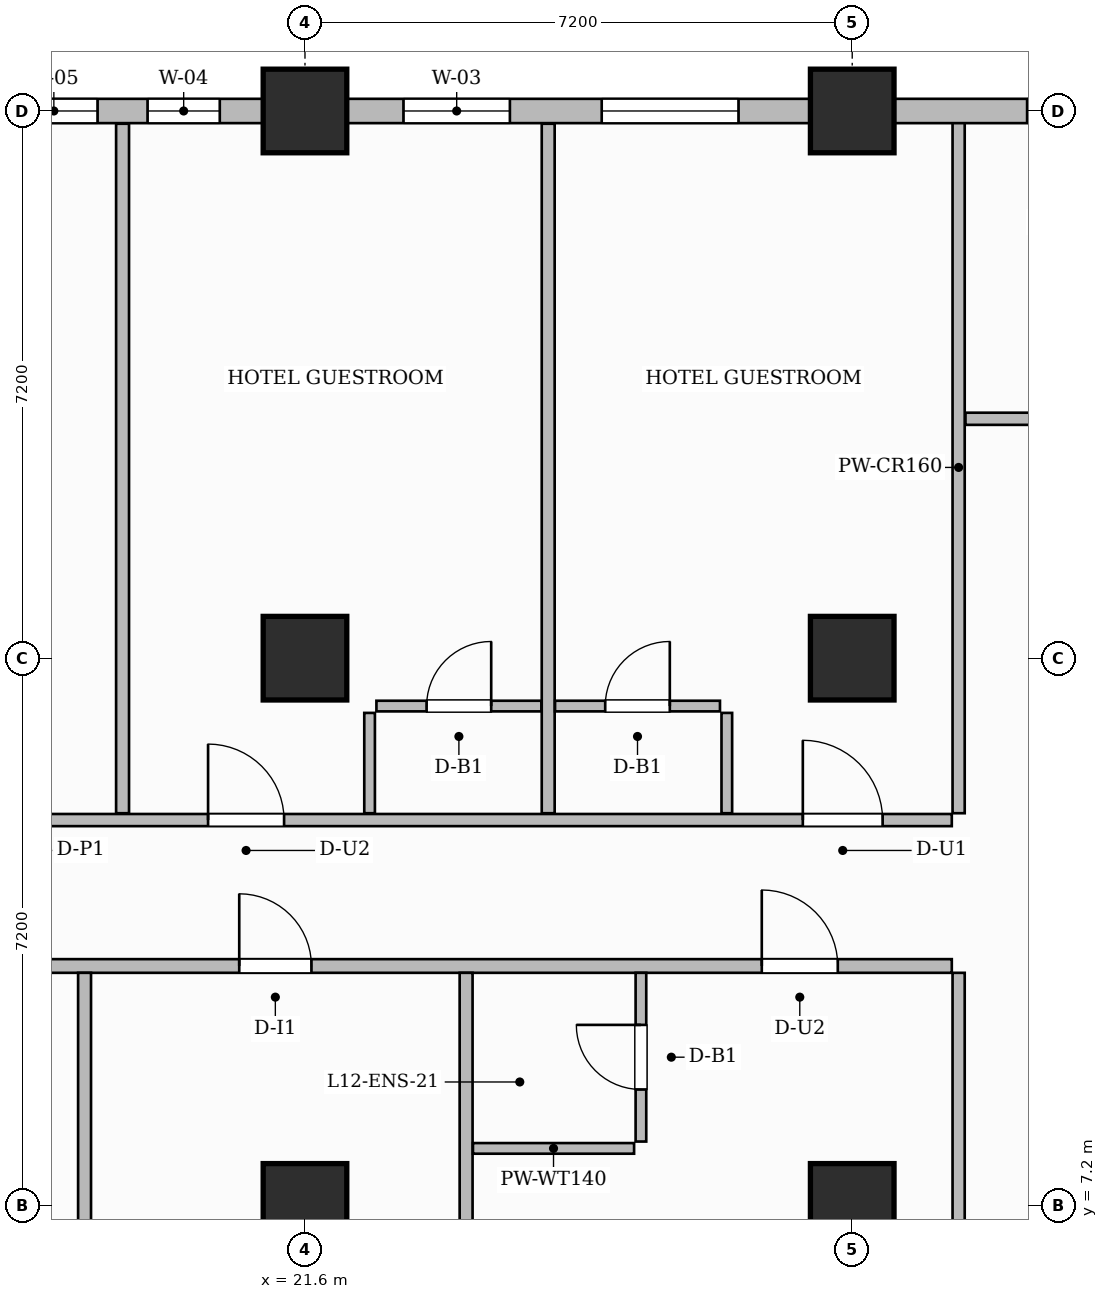
"""IFC4 building model, lengths in metres.
Left out: names, types, materials, properties, quantities, classifications, styles, units other than length and angle.
Written with IfcOpenShell. Run it as: python <this file> out.ifc"""

import sys

from ifc_helpers import new_model, si_unit, direction, frame, frame_2d, origin, origin_2d, place, context, subcontext, project, spatial, rectangle, extrude, source, transform, mapped, element, fill, save


model = new_model("IFC4")
c1 = context("Model", 3, precision=1e-05, world=origin(), true_north=direction((0.0, 1.0)))
c2 = subcontext(c1, "Body", "Model", "MODEL_VIEW")
j1 = project(units=[si_unit("LENGTHUNIT", "METRE"), si_unit("PLANEANGLEUNIT", "RADIAN")], contexts=[c1])
p1 = place(None, origin())
s1 = spatial("IfcSite", under=j1, at=p1, CompositionType="ELEMENT")
p2 = place(p1, origin())
s2 = spatial("IfcBuilding", under=s1, at=p2, CompositionType="ELEMENT")
p3 = place(p2, frame((0.0, 0.0, 54.6)))
s3 = spatial("IfcBuildingStorey", under=s2, at=p3, CompositionType="ELEMENT", Elevation=54.6)
m1 = source(origin(), c2, "Body", "SweptSolid", [
    extrude(rectangle(XDim=1.1, YDim=1.1, at=origin_2d()), origin(), (0.0, 0.0, 1.0), 3.7),
])
for number, where, z_axis, x_axis in (
    (1, (21.6, 7.2, 0.0), (0.0, 0.0, 1.0), (1.0, 0.0, 0.0)),
    (2, (21.6, 14.4, 0.0), (0.0, 0.0, 1.0), (1.0, 0.0, 0.0)),
    (3, (21.6, 21.6, 0.0), (0.0, 0.0, 1.0), (1.0, 0.0, 0.0)),
    (4, (28.8, 7.2, 0.0), (0.0, 0.0, 1.0), (1.0, 0.0, 0.0)),
    (5, (28.8, 14.4, 0.0), (0.0, 0.0, 1.0), (1.0, 0.0, 0.0)),
    (6, (28.8, 21.6, 0.0), (0.0, 0.0, 1.0), (1.0, 0.0, 0.0)),
):
    element("IfcColumn", number, at=place(p3, frame(where, z_axis=z_axis, x_axis=x_axis)), inside=s3, PredefinedType="COLUMN", context=c2, shape_type="MappedRepresentation", body=[
        mapped(m1, transform((0.0, 0.0, 0.0), scale=1.0)),
    ])
p4 = place(p3, frame((14.568, 10.35, 0.0), z_axis=(0.0, 0.0, 1.0), x_axis=(1.0, 0.0, 0.0)))
e7 = element("IfcWall", 7, at=p4, inside=s3, PredefinedType="PARTITIONING", context=c2, shape_type="SweptSolid", body=[
    extrude(rectangle(XDim=15.542, YDim=0.18, at=frame_2d((7.771, 0.0))), origin(), (0.0, 0.0, 1.0), 3.45),
])
p5 = place(p4, frame((1.282, 0.0, 0.0)))
e8 = element("IfcOpeningElement", 8, at=p5, cuts=e7, PredefinedType="OPENING", context=c2, shape_type="SweptSolid", body=[
    extrude(rectangle(XDim=1.4, YDim=2.35, at=frame_2d((0.7, 1.175))), frame((0.0, 0.1, 0.0), z_axis=(0.0, -1.0, 0.0), x_axis=(1.0, 0.0, 0.0)), (0.0, 0.0, 1.0), 0.2),
])
p6 = place(p4, frame((6.167, 0.0, 0.0)))
e9 = element("IfcOpeningElement", 9, at=p6, cuts=e7, PredefinedType="OPENING", context=c2, shape_type="SweptSolid", body=[
    extrude(rectangle(XDim=0.95, YDim=2.15, at=frame_2d((0.475, 1.075))), frame((0.0, 0.1, 0.0), z_axis=(0.0, -1.0, 0.0), x_axis=(1.0, 0.0, 0.0)), (0.0, 0.0, 1.0), 0.2),
])
p7 = place(p4, frame((13.042, 0.0, 0.0)))
e10 = element("IfcOpeningElement", 10, at=p7, cuts=e7, PredefinedType="OPENING", context=c2, shape_type="SweptSolid", body=[
    extrude(rectangle(XDim=1.0, YDim=2.2, at=frame_2d((0.5, 1.1))), frame((0.0, 0.1, 0.0), z_axis=(0.0, -1.0, 0.0), x_axis=(1.0, 0.0, 0.0)), (0.0, 0.0, 1.0), 0.2),
])
p8 = place(p3, frame((14.568, 12.27, 0.0), z_axis=(0.0, 0.0, 1.0), x_axis=(1.0, 0.0, 0.0)))
e11 = element("IfcWall", 11, at=p8, inside=s3, PredefinedType="PARTITIONING", context=c2, shape_type="SweptSolid", body=[
    extrude(rectangle(XDim=15.542, YDim=0.16, at=frame_2d((7.771, 0.0))), origin(), (0.0, 0.0, 1.0), 3.45),
])
p9 = place(p8, frame((1.582, 0.0, 0.0)))
e12 = element("IfcOpeningElement", 12, at=p9, cuts=e11, PredefinedType="OPENING", context=c2, shape_type="SweptSolid", body=[
    extrude(rectangle(XDim=1.4, YDim=2.35, at=frame_2d((0.7, 1.175))), frame((0.0, 0.09, 0.0), z_axis=(0.0, -1.0, 0.0), x_axis=(1.0, 0.0, 0.0)), (0.0, 0.0, 1.0), 0.18),
])
p10 = place(p8, frame((5.757, 0.0, 0.0)))
e13 = element("IfcOpeningElement", 13, at=p10, cuts=e11, PredefinedType="OPENING", context=c2, shape_type="SweptSolid", body=[
    extrude(rectangle(XDim=1.0, YDim=2.2, at=frame_2d((0.5, 1.1))), frame((0.0, 0.09, 0.0), z_axis=(0.0, -1.0, 0.0), x_axis=(1.0, 0.0, 0.0)), (0.0, 0.0, 1.0), 0.18),
])
p11 = place(p8, frame((13.582, 0.0, 0.0)))
e14 = element("IfcOpeningElement", 14, at=p11, cuts=e11, PredefinedType="OPENING", context=c2, shape_type="SweptSolid", body=[
    extrude(rectangle(XDim=1.05, YDim=2.25, at=frame_2d((0.525, 1.125))), frame((0.0, 0.09, 0.0), z_axis=(0.0, -1.0, 0.0), x_axis=(1.0, 0.0, 0.0)), (0.0, 0.0, 1.0), 0.18),
])
p12 = place(p3, frame((30.2, 12.36, 0.0), z_axis=(0.0, 0.0, 1.0), x_axis=(0.0, 1.0, 0.0)))
e15 = element("IfcWall", 15, at=p12, inside=s3, PredefinedType="PARTITIONING", context=c2, shape_type="SweptSolid", body=[
    extrude(rectangle(XDim=9.1, YDim=0.16, at=frame_2d((4.55, 0.0))), origin(), (0.0, 0.0, 1.0), 3.45),
])
p13 = place(p3, frame((30.29, 17.55, 0.0), z_axis=(0.0, 0.0, 1.0), x_axis=(1.0, 0.0, 0.0)))
e16 = element("IfcWall", 16, at=p13, inside=s3, PredefinedType="PARTITIONING", context=c2, shape_type="SweptSolid", body=[
    extrude(rectangle(XDim=19.37, YDim=0.16, at=frame_2d((9.685, 0.0))), origin(), (0.0, 0.0, 1.0), 3.45),
])
p14 = place(p13, frame((1.285, 0.0, 0.0)))
e17 = element("IfcOpeningElement", 17, at=p14, cuts=e16, PredefinedType="OPENING", context=c2, shape_type="SweptSolid", body=[
    extrude(rectangle(XDim=0.85, YDim=2.1, at=frame_2d((0.425, 1.05))), frame((0.0, 0.09, 0.0), z_axis=(0.0, -1.0, 0.0), x_axis=(1.0, 0.0, 0.0)), (0.0, 0.0, 1.0), 0.18),
])
p15 = place(p13, frame((10.66, 0.0, 0.0)))
e18 = element("IfcOpeningElement", 18, at=p15, cuts=e16, PredefinedType="OPENING", context=c2, shape_type="SweptSolid", body=[
    extrude(rectangle(XDim=1.6, YDim=2.4, at=frame_2d((0.8, 1.2))), frame((0.0, 0.09, 0.0), z_axis=(0.0, -1.0, 0.0), x_axis=(1.0, 0.0, 0.0)), (0.0, 0.0, 1.0), 0.18),
])
p16 = place(p3, frame((30.2, 0.168, 0.0), z_axis=(0.0, 0.0, 1.0), x_axis=(0.0, 1.0, 0.0)))
e19 = element("IfcWall", 19, at=p16, inside=s3, PredefinedType="PARTITIONING", context=c2, shape_type="SweptSolid", body=[
    extrude(rectangle(XDim=10.092, YDim=0.16, at=frame_2d((5.046, 0.0))), origin(), (0.0, 0.0, 1.0), 3.45),
])
p17 = place(p16, frame((1.957, 0.0, 0.0)))
e20 = element("IfcOpeningElement", 20, at=p17, cuts=e19, PredefinedType="OPENING", context=c2, shape_type="SweptSolid", body=[
    extrude(rectangle(XDim=1.05, YDim=2.15, at=frame_2d((0.525, 1.075))), frame((0.0, 0.09, 0.0), z_axis=(0.0, -1.0, 0.0), x_axis=(1.0, 0.0, 0.0)), (0.0, 0.0, 1.0), 0.18),
])
for number, where, z_axis, x_axis in (
    (21, (18.7, 0.168, 0.0), (0.0, 0.0, 1.0), (0.0, 1.0, 0.0)),
    (22, (23.72, 0.168, 0.0), (0.0, 0.0, 1.0), (0.0, 1.0, 0.0)),
):
    element("IfcWall", number, at=place(p3, frame(where, z_axis=z_axis, x_axis=x_axis)), inside=s3, PredefinedType="PARTITIONING", context=c2, shape_type="SweptSolid", body=[
        extrude(rectangle(XDim=10.092, YDim=0.17, at=frame_2d((5.046, 0.0))), origin(), (0.0, 0.0, 1.0), 3.45),
    ])
p18 = place(p3, frame((26.02, 8.04, 0.0), z_axis=(0.0, 0.0, 1.0), x_axis=(0.0, 1.0, 0.0)))
e23 = element("IfcWall", 23, at=p18, inside=s3, PredefinedType="PARTITIONING", context=c2, shape_type="SweptSolid", body=[
    extrude(rectangle(XDim=2.22, YDim=0.14, at=frame_2d((1.11, 0.0))), origin(), (0.0, 0.0, 1.0), 3.45),
])
p19 = place(p18, frame((0.685, 0.0, 0.0)))
e24 = element("IfcOpeningElement", 24, at=p19, cuts=e23, PredefinedType="OPENING", context=c2, shape_type="SweptSolid", body=[
    extrude(rectangle(XDim=0.85, YDim=2.1, at=frame_2d((0.425, 1.05))), frame((0.0, 0.08, 0.0), z_axis=(0.0, -1.0, 0.0), x_axis=(1.0, 0.0, 0.0)), (0.0, 0.0, 1.0), 0.16),
])
p20 = place(p3, frame((23.81, 7.95, 0.0), z_axis=(0.0, 0.0, 1.0), x_axis=(1.0, 0.0, 0.0)))
e25 = element("IfcWall", 25, at=p20, inside=s3, PredefinedType="PARTITIONING", context=c2, shape_type="SweptSolid", body=[
    extrude(rectangle(XDim=2.12, YDim=0.14, at=frame_2d((1.06, 0.0))), origin(), (0.0, 0.0, 1.0), 3.45),
])
for number, where, z_axis, x_axis in (
    (26, (19.2, 12.36, 0.0), (0.0, 0.0, 1.0), (0.0, 1.0, 0.0)),
    (27, (24.8, 12.36, 0.0), (0.0, 0.0, 1.0), (0.0, 1.0, 0.0)),
):
    element("IfcWall", number, at=place(p3, frame(where, z_axis=z_axis, x_axis=x_axis)), inside=s3, PredefinedType="PARTITIONING", context=c2, shape_type="SweptSolid", body=[
        extrude(rectangle(XDim=9.072, YDim=0.17, at=frame_2d((4.536, 0.0))), origin(), (0.0, 0.0, 1.0), 3.45),
    ])
p21 = place(p3, frame((22.45, 12.36, 0.0), z_axis=(0.0, 0.0, 1.0), x_axis=(0.0, 1.0, 0.0)))
e28 = element("IfcWall", 28, at=p21, inside=s3, PredefinedType="PARTITIONING", context=c2, shape_type="SweptSolid", body=[
    extrude(rectangle(XDim=1.32, YDim=0.14, at=frame_2d((0.66, 0.0))), origin(), (0.0, 0.0, 1.0), 3.45),
])
p22 = place(p3, frame((22.54, 13.77, 0.0), z_axis=(0.0, 0.0, 1.0), x_axis=(1.0, 0.0, 0.0)))
e29 = element("IfcWall", 29, at=p22, inside=s3, PredefinedType="PARTITIONING", context=c2, shape_type="SweptSolid", body=[
    extrude(rectangle(XDim=2.17, YDim=0.14, at=frame_2d((1.085, 0.0))), origin(), (0.0, 0.0, 1.0), 3.45),
])
p23 = place(p22, frame((0.66, 0.0, 0.0)))
e30 = element("IfcOpeningElement", 30, at=p23, cuts=e29, PredefinedType="OPENING", context=c2, shape_type="SweptSolid", body=[
    extrude(rectangle(XDim=0.85, YDim=2.1, at=frame_2d((0.425, 1.05))), frame((0.0, 0.08, 0.0), z_axis=(0.0, -1.0, 0.0), x_axis=(1.0, 0.0, 0.0)), (0.0, 0.0, 1.0), 0.16),
])
p24 = place(p3, frame((27.15, 12.36, 0.0), z_axis=(0.0, 0.0, 1.0), x_axis=(0.0, 1.0, 0.0)))
e31 = element("IfcWall", 31, at=p24, inside=s3, PredefinedType="PARTITIONING", context=c2, shape_type="SweptSolid", body=[
    extrude(rectangle(XDim=1.32, YDim=0.14, at=frame_2d((0.66, 0.0))), origin(), (0.0, 0.0, 1.0), 3.45),
])
p25 = place(p3, frame((24.89, 13.77, 0.0), z_axis=(0.0, 0.0, 1.0), x_axis=(1.0, 0.0, 0.0)))
e32 = element("IfcWall", 32, at=p25, inside=s3, PredefinedType="PARTITIONING", context=c2, shape_type="SweptSolid", body=[
    extrude(rectangle(XDim=2.17, YDim=0.14, at=frame_2d((1.085, 0.0))), origin(), (0.0, 0.0, 1.0), 3.45),
])
p26 = place(p25, frame((0.66, 0.0, 0.0)))
e33 = element("IfcOpeningElement", 33, at=p26, cuts=e32, PredefinedType="OPENING", context=c2, shape_type="SweptSolid", body=[
    extrude(rectangle(XDim=0.85, YDim=2.1, at=frame_2d((0.425, 1.05))), frame((0.0, 0.08, 0.0), z_axis=(0.0, -1.0, 0.0), x_axis=(1.0, 0.0, 0.0)), (0.0, 0.0, 1.0), 0.16),
])
p27 = place(p3, frame((14.4, 21.6, 0.0), z_axis=(0.0, 0.0, 1.0), x_axis=(1.0, 0.0, 0.0)))
e34 = element("IfcWall", 34, at=p27, inside=s3, PredefinedType="SOLIDWALL", context=c2, shape_type="SweptSolid", body=[
    extrude(rectangle(XDim=43.2, YDim=0.32, at=frame_2d((21.6, 0.0))), origin(), (0.0, 0.0, 1.0), 2.885),
])
p28 = place(p27, frame((1.5, 0.0, 0.0)))
e35 = element("IfcOpeningElement", 35, at=p28, cuts=e34, PredefinedType="OPENING", context=c2, shape_type="SweptSolid", body=[
    extrude(rectangle(XDim=1.2, YDim=2.2, at=frame_2d((0.6, 1.1))), frame((0.0, 0.17, 0.0), z_axis=(0.0, -1.0, 0.0), x_axis=(1.0, 0.0, 0.0)), (0.0, 0.0, 1.0), 0.34),
])
p29 = place(p27, frame((3.321, 0.0, 0.8)))
e36 = element("IfcOpeningElement", 36, at=p29, cuts=e34, PredefinedType="OPENING", context=c2, shape_type="SweptSolid", body=[
    extrude(rectangle(XDim=1.15, YDim=1.8, at=frame_2d((0.575, 0.9))), frame((0.0, 0.17, 0.0), z_axis=(0.0, -1.0, 0.0), x_axis=(1.0, 0.0, 0.0)), (0.0, 0.0, 1.0), 0.34),
])
p30 = place(p27, frame((5.129, 0.0, 0.8)))
e37 = element("IfcOpeningElement", 37, at=p30, cuts=e34, PredefinedType="OPENING", context=c2, shape_type="SweptSolid", body=[
    extrude(rectangle(XDim=0.95, YDim=1.75, at=frame_2d((0.475, 0.875))), frame((0.0, 0.17, 0.0), z_axis=(0.0, -1.0, 0.0), x_axis=(1.0, 0.0, 0.0)), (0.0, 0.0, 1.0), 0.34),
])
p31 = place(p27, frame((8.496, 0.0, 0.8)))
e38 = element("IfcOpeningElement", 38, at=p31, cuts=e34, PredefinedType="OPENING", context=c2, shape_type="SweptSolid", body=[
    extrude(rectangle(XDim=1.4, YDim=1.85, at=frame_2d((0.7, 0.925))), frame((0.0, 0.17, 0.0), z_axis=(0.0, -1.0, 0.0), x_axis=(1.0, 0.0, 0.0)), (0.0, 0.0, 1.0), 0.34),
])
p32 = place(p27, frame((11.104, 0.0, 0.8)))
e39 = element("IfcOpeningElement", 39, at=p32, cuts=e34, PredefinedType="OPENING", context=c2, shape_type="SweptSolid", body=[
    extrude(rectangle(XDim=1.8, YDim=1.85, at=frame_2d((0.9, 0.925))), frame((0.0, 0.17, 0.0), z_axis=(0.0, -1.0, 0.0), x_axis=(1.0, 0.0, 0.0)), (0.0, 0.0, 1.0), 0.34),
])
p33 = place(p27, frame((16.701, 0.0, 0.8)))
e40 = element("IfcOpeningElement", 40, at=p33, cuts=e34, PredefinedType="OPENING", context=c2, shape_type="SweptSolid", body=[
    extrude(rectangle(XDim=1.8, YDim=1.85, at=frame_2d((0.9, 0.925))), frame((0.0, 0.17, 0.0), z_axis=(0.0, -1.0, 0.0), x_axis=(1.0, 0.0, 0.0)), (0.0, 0.0, 1.0), 0.34),
])
p34 = place(p27, frame((21.725, 0.0, 0.8)))
e41 = element("IfcOpeningElement", 41, at=p34, cuts=e34, PredefinedType="OPENING", context=c2, shape_type="SweptSolid", body=[
    extrude(rectangle(XDim=1.8, YDim=1.85, at=frame_2d((0.9, 0.925))), frame((0.0, 0.17, 0.0), z_axis=(0.0, -1.0, 0.0), x_axis=(1.0, 0.0, 0.0)), (0.0, 0.0, 1.0), 0.34),
])
p35 = place(p27, frame((24.475, 0.0, 0.8)))
e42 = element("IfcOpeningElement", 42, at=p35, cuts=e34, PredefinedType="OPENING", context=c2, shape_type="SweptSolid", body=[
    extrude(rectangle(XDim=1.8, YDim=1.85, at=frame_2d((0.9, 0.925))), frame((0.0, 0.17, 0.0), z_axis=(0.0, -1.0, 0.0), x_axis=(1.0, 0.0, 0.0)), (0.0, 0.0, 1.0), 0.34),
])
p36 = place(p27, frame((29.075, 0.0, 0.8)))
e43 = element("IfcOpeningElement", 43, at=p36, cuts=e34, PredefinedType="OPENING", context=c2, shape_type="SweptSolid", body=[
    extrude(rectangle(XDim=1.8, YDim=1.85, at=frame_2d((0.9, 0.925))), frame((0.0, 0.17, 0.0), z_axis=(0.0, -1.0, 0.0), x_axis=(1.0, 0.0, 0.0)), (0.0, 0.0, 1.0), 0.34),
])
p37 = place(p27, frame((32.125, 0.0, 0.8)))
e44 = element("IfcOpeningElement", 44, at=p37, cuts=e34, PredefinedType="OPENING", context=c2, shape_type="SweptSolid", body=[
    extrude(rectangle(XDim=1.8, YDim=1.85, at=frame_2d((0.9, 0.925))), frame((0.0, 0.17, 0.0), z_axis=(0.0, -1.0, 0.0), x_axis=(1.0, 0.0, 0.0)), (0.0, 0.0, 1.0), 0.34),
])
p38 = place(p27, frame((36.875, 0.0, 0.8)))
e45 = element("IfcOpeningElement", 45, at=p38, cuts=e34, PredefinedType="OPENING", context=c2, shape_type="SweptSolid", body=[
    extrude(rectangle(XDim=1.8, YDim=1.85, at=frame_2d((0.9, 0.925))), frame((0.0, 0.17, 0.0), z_axis=(0.0, -1.0, 0.0), x_axis=(1.0, 0.0, 0.0)), (0.0, 0.0, 1.0), 0.34),
])
p39 = place(p27, frame((39.925, 0.0, 0.8)))
e46 = element("IfcOpeningElement", 46, at=p39, cuts=e34, PredefinedType="OPENING", context=c2, shape_type="SweptSolid", body=[
    extrude(rectangle(XDim=1.8, YDim=1.85, at=frame_2d((0.9, 0.925))), frame((0.0, 0.17, 0.0), z_axis=(0.0, -1.0, 0.0), x_axis=(1.0, 0.0, 0.0)), (0.0, 0.0, 1.0), 0.34),
])
m2 = source(origin(), c2, "Body", "SweptSolid", [
    extrude(rectangle(XDim=0.95, YDim=2.15, at=frame_2d((0.475, 1.075))), frame((0.0, 0.025, 0.0), z_axis=(0.0, -1.0, 0.0), x_axis=(1.0, 0.0, 0.0)), (0.0, 0.0, 1.0), 0.05),
])
p40 = place(p6, origin())
e47 = element("IfcDoor", 47, at=p40, inside=s3, OperationType="SINGLE_SWING_LEFT", PredefinedType="DOOR", context=c2, shape_type="MappedRepresentation", body=[
    mapped(m2, transform((0.0, 0.0, 0.0), scale=1.0)),
])
fill(e9, e47)
m3 = source(origin(), c2, "Body", "SweptSolid", [
    extrude(rectangle(XDim=0.85, YDim=2.1, at=frame_2d((0.425, 1.05))), frame((0.0, 0.025, 0.0), z_axis=(0.0, -1.0, 0.0), x_axis=(1.0, 0.0, 0.0)), (0.0, 0.0, 1.0), 0.05),
])
p41 = place(p19, origin())
e48 = element("IfcDoor", 48, at=p41, inside=s3, OperationType="SINGLE_SWING_RIGHT", PredefinedType="DOOR", context=c2, shape_type="MappedRepresentation", body=[
    mapped(m3, transform((0.0, 0.0, 0.0), scale=1.0)),
])
fill(e24, e48)
m4 = source(origin(), c2, "Body", "SweptSolid", [
    extrude(rectangle(XDim=1.0, YDim=2.2, at=frame_2d((0.5, 1.1))), frame((0.0, 0.025, 0.0), z_axis=(0.0, -1.0, 0.0), x_axis=(1.0, 0.0, 0.0)), (0.0, 0.0, 1.0), 0.05),
])
p42 = place(p7, origin())
e49 = element("IfcDoor", 49, at=p42, inside=s3, OperationType="SINGLE_SWING_LEFT", PredefinedType="DOOR", context=c2, shape_type="MappedRepresentation", body=[
    mapped(m4, transform((0.0, 0.0, 0.0), scale=1.0)),
])
fill(e10, e49)
p43 = place(p23, origin())
e50 = element("IfcDoor", 50, at=p43, inside=s3, OperationType="SINGLE_SWING_RIGHT", PredefinedType="DOOR", context=c2, shape_type="MappedRepresentation", body=[
    mapped(m3, transform((0.0, 0.0, 0.0), scale=1.0)),
])
fill(e30, e50)
p44 = place(p10, origin())
e51 = element("IfcDoor", 51, at=p44, inside=s3, OperationType="SINGLE_SWING_LEFT", PredefinedType="DOOR", context=c2, shape_type="MappedRepresentation", body=[
    mapped(m4, transform((0.0, 0.0, 0.0), scale=1.0)),
])
fill(e13, e51)
p45 = place(p26, origin())
e52 = element("IfcDoor", 52, at=p45, inside=s3, OperationType="SINGLE_SWING_RIGHT", PredefinedType="DOOR", context=c2, shape_type="MappedRepresentation", body=[
    mapped(m3, transform((0.0, 0.0, 0.0), scale=1.0)),
])
fill(e33, e52)
m5 = source(origin(), c2, "Body", "SweptSolid", [
    extrude(rectangle(XDim=1.05, YDim=2.25, at=frame_2d((0.525, 1.125))), frame((0.0, 0.025, 0.0), z_axis=(0.0, -1.0, 0.0), x_axis=(1.0, 0.0, 0.0)), (0.0, 0.0, 1.0), 0.05),
])
p46 = place(p11, origin())
e53 = element("IfcDoor", 53, at=p46, inside=s3, OperationType="SINGLE_SWING_LEFT", PredefinedType="DOOR", context=c2, shape_type="MappedRepresentation", body=[
    mapped(m5, transform((0.0, 0.0, 0.0), scale=1.0)),
])
fill(e14, e53)
m6 = source(origin(), c2, "Body", "SweptSolid", [
    extrude(rectangle(XDim=1.15, YDim=1.8, at=frame_2d((0.575, 0.9))), frame((0.0, 0.03, 0.0), z_axis=(0.0, -1.0, 0.0), x_axis=(1.0, 0.0, 0.0)), (0.0, 0.0, 1.0), 0.06),
])
p47 = place(p29, origin())
e54 = element("IfcWindow", 54, at=p47, inside=s3, PartitioningType="SINGLE_PANEL", PredefinedType="WINDOW", context=c2, shape_type="MappedRepresentation", body=[
    mapped(m6, transform((0.0, 0.0, 0.0), scale=1.0)),
])
fill(e36, e54)
m7 = source(origin(), c2, "Body", "SweptSolid", [
    extrude(rectangle(XDim=0.95, YDim=1.75, at=frame_2d((0.475, 0.875))), frame((0.0, 0.03, 0.0), z_axis=(0.0, -1.0, 0.0), x_axis=(1.0, 0.0, 0.0)), (0.0, 0.0, 1.0), 0.06),
])
p48 = place(p30, origin())
e55 = element("IfcWindow", 55, at=p48, inside=s3, PartitioningType="SINGLE_PANEL", PredefinedType="WINDOW", context=c2, shape_type="MappedRepresentation", body=[
    mapped(m7, transform((0.0, 0.0, 0.0), scale=1.0)),
])
fill(e37, e55)
m8 = source(origin(), c2, "Body", "SweptSolid", [
    extrude(rectangle(XDim=1.4, YDim=1.85, at=frame_2d((0.7, 0.925))), frame((0.0, 0.03, 0.0), z_axis=(0.0, -1.0, 0.0), x_axis=(1.0, 0.0, 0.0)), (0.0, 0.0, 1.0), 0.06),
])
p49 = place(p31, origin())
e56 = element("IfcWindow", 56, at=p49, inside=s3, PartitioningType="SINGLE_PANEL", PredefinedType="WINDOW", context=c2, shape_type="MappedRepresentation", body=[
    mapped(m8, transform((0.0, 0.0, 0.0), scale=1.0)),
])
fill(e38, e56)
m9 = source(origin(), c2, "Body", "SweptSolid", [
    extrude(rectangle(XDim=1.8, YDim=1.85, at=frame_2d((0.9, 0.925))), frame((0.0, 0.03, 0.0), z_axis=(0.0, -1.0, 0.0), x_axis=(1.0, 0.0, 0.0)), (0.0, 0.0, 1.0), 0.06),
])
p50 = place(p32, origin())
e57 = element("IfcWindow", 57, at=p50, inside=s3, PartitioningType="DOUBLE_PANEL_VERTICAL", PredefinedType="WINDOW", context=c2, shape_type="MappedRepresentation", body=[
    mapped(m9, transform((0.0, 0.0, 0.0), scale=1.0)),
])
fill(e39, e57)
p51 = place(p33, origin())
e58 = element("IfcWindow", 58, at=p51, inside=s3, PartitioningType="DOUBLE_PANEL_VERTICAL", PredefinedType="WINDOW", context=c2, shape_type="MappedRepresentation", body=[
    mapped(m9, transform((0.0, 0.0, 0.0), scale=1.0)),
])
fill(e40, e58)
save(model, sys.argv[1])
